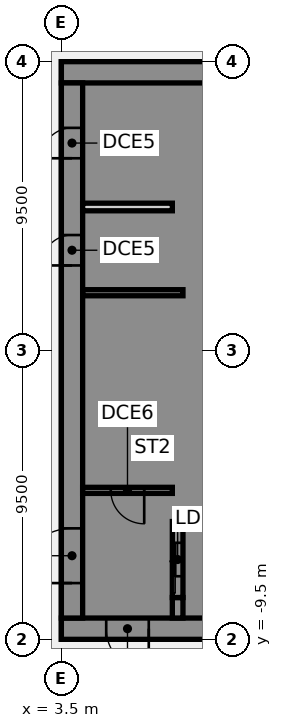
"""IFC4 building model, lengths in metres.
Left out: names, types, materials, properties, quantities, classifications, styles, units other than length and angle.
Written with IfcOpenShell. Run it as: python <this file> out.ifc"""

import sys

from ifc_helpers import new_model, si_unit, direction, frame, frame_2d, origin, place, context, subcontext, project, spatial, polyline, rectangle, outline, extrude, element, fill, save


model = new_model("IFC4")
c1 = context("Model", 3, precision=1e-05, world=origin(), true_north=direction((0.0, 1.0)))
c2 = subcontext(c1, "Body", "Model", "MODEL_VIEW")
j1 = project(units=[si_unit("LENGTHUNIT", "METRE"), si_unit("PLANEANGLEUNIT", "RADIAN")], contexts=[c1])
p1 = place(None, origin())
s1 = spatial("IfcSite", under=j1, at=p1, CompositionType="ELEMENT")
p2 = place(p1, origin())
s2 = spatial("IfcBuilding", under=s1, at=p2, CompositionType="ELEMENT")
p3 = place(p2, frame((0.0, 0.0, 49.0)))
s3 = spatial("IfcBuildingStorey", under=s2, at=p3, CompositionType="ELEMENT", Elevation=49.0)
p4 = place(p3, frame((16.5, -9.15, 0.0), z_axis=(0.0, 0.0, 1.0), x_axis=(-1.0, 0.0, 0.0)))
e1 = element("IfcWall", 1, at=p4, inside=s3, PredefinedType="SHEAR", context=c2, shape_type="SweptSolid", body=[
    extrude(rectangle(XDim=13.0, YDim=0.7, at=frame_2d((6.5, 0.0))), origin(), (0.0, 0.0, 1.0), 3.61),
])
p5 = place(p4, frame((4.15, 0.0, 0.0)))
e2 = element("IfcOpeningElement", 2, at=p5, cuts=e1, PredefinedType="OPENING", context=c2, shape_type="SweptSolid", body=[
    extrude(rectangle(XDim=1.4, YDim=2.1, at=frame_2d((0.7, 1.05))), frame((0.0, 0.36, 0.0), z_axis=(0.0, -1.0, 0.0), x_axis=(1.0, 0.0, 0.0)), (0.0, 0.0, 1.0), 0.72),
])
p6 = place(p4, frame((10.125, 0.0, 0.0)))
e3 = element("IfcOpeningElement", 3, at=p6, cuts=e1, PredefinedType="OPENING", context=c2, shape_type="SweptSolid", body=[
    extrude(rectangle(XDim=1.4, YDim=2.1, at=frame_2d((0.7, 1.05))), frame((0.0, 0.36, 0.0), z_axis=(0.0, -1.0, 0.0), x_axis=(1.0, 0.0, 0.0)), (0.0, 0.0, 1.0), 0.72),
])
p7 = place(p3, frame((16.5, 9.15, 0.0), z_axis=(0.0, 0.0, 1.0), x_axis=(-1.0, 0.0, 0.0)))
e4 = element("IfcWall", 4, at=p7, inside=s3, PredefinedType="SHEAR", context=c2, shape_type="SweptSolid", body=[
    extrude(rectangle(XDim=13.0, YDim=0.7, at=frame_2d((6.5, 0.0))), origin(), (0.0, 0.0, 1.0), 3.61),
])
p8 = place(p3, origin())
e5 = element("IfcWall", 5, at=p8, inside=s3, PredefinedType="SHEAR", context=c2, shape_type="SweptSolid", body=[
    extrude(outline(polyline([(9.8, -5.375), (7.5, -5.375), (7.5, -2.875), (9.8, -2.875), (9.8, -2.625), (7.5, -2.625), (7.5, -0.125), (9.8, -0.125), (9.8, 0.125), (7.5, 0.125), (7.5, 2.625), (9.8, 2.625), (9.8, 2.875), (7.5, 2.875), (7.5, 5.375), (9.8, 5.375), (9.8, 5.625), (7.5, 5.625), (7.5, 8.125), (9.8, 8.125), (9.8, 8.8), (7.5, 8.8), (7.15, 8.8), (7.15, -5.625), (7.5, -5.625), (9.8, -5.625), (9.8, -5.375)])), origin(), (0.0, 0.0, 1.0), 3.61),
])
p9 = place(p3, origin())
e6 = element("IfcWall", 6, at=p9, inside=s3, PredefinedType="SHEAR", context=c2, shape_type="SweptSolid", body=[
    extrude(outline(polyline([(7.5, -8.125), (7.5, -8.8), (9.8, -8.8), (9.8, -8.125), (9.8, -5.625), (9.55, -5.625), (9.55, -8.125), (7.5, -8.125)])), origin(), (0.0, 0.0, 1.0), 3.61),
])
p10 = place(p3, frame((7.325, -8.8, 0.0), z_axis=(0.0, 0.0, 1.0), x_axis=(0.0, 1.0, 0.0)))
e7 = element("IfcWall", 7, at=p10, inside=s3, PredefinedType="SHEAR", context=c2, shape_type="SweptSolid", body=[
    extrude(rectangle(XDim=0.675, YDim=0.35, at=frame_2d((0.337, 0.0))), origin(), (0.0, 0.0, 1.0), 3.61),
])
p11 = place(p3, frame((7.5, 1.9, 0.0), z_axis=(0.0, 0.0, 1.0), x_axis=(-1.0, 0.0, 0.0)))
e8 = element("IfcWall", 8, at=p11, inside=s3, PredefinedType="SHEAR", context=c2, shape_type="SweptSolid", body=[
    extrude(rectangle(XDim=3.3, YDim=0.2, at=frame_2d((1.65, 0.0))), origin(), (0.0, 0.0, 1.0), 3.61),
])
p12 = place(p3, frame((7.325, -8.125, 0.0), z_axis=(0.0, 0.0, 1.0), x_axis=(0.0, 1.0, 0.0)))
e9 = element("IfcWall", 9, at=p12, inside=s3, PredefinedType="SHEAR", context=c2, shape_type="SweptSolid", body=[
    extrude(rectangle(XDim=2.5, YDim=0.35, at=frame_2d((1.25, 0.0))), origin(), (0.0, 0.0, 1.0), 3.61),
])
p13 = place(p12, frame((0.7, 0.0, 0.0)))
e10 = element("IfcOpeningElement", 10, at=p13, cuts=e9, PredefinedType="OPENING", context=c2, shape_type="SweptSolid", body=[
    extrude(rectangle(XDim=1.1, YDim=2.1, at=frame_2d((0.55, 1.05))), frame((0.0, 0.185, 0.0), z_axis=(0.0, -1.0, 0.0), x_axis=(1.0, 0.0, 0.0)), (0.0, 0.0, 1.0), 0.37),
])
p14 = place(p3, frame((3.85, -8.8, 0.0), z_axis=(0.0, 0.0, 1.0), x_axis=(0.0, 1.0, 0.0)))
e11 = element("IfcWall", 11, at=p14, inside=s3, PredefinedType="SHEAR", context=c2, shape_type="SweptSolid", body=[
    extrude(rectangle(XDim=17.6, YDim=0.7, at=frame_2d((8.8, 0.0))), origin(), (0.0, 0.0, 1.0), 3.61),
])
p15 = place(p14, frame((1.15, 0.0, 0.0)))
e12 = element("IfcOpeningElement", 12, at=p15, cuts=e11, PredefinedType="OPENING", context=c2, shape_type="SweptSolid", body=[
    extrude(rectangle(XDim=1.8, YDim=2.1, at=frame_2d((0.9, 1.05))), frame((0.0, 0.36, 0.0), z_axis=(0.0, -1.0, 0.0), x_axis=(1.0, 0.0, 0.0)), (0.0, 0.0, 1.0), 0.72),
])
p16 = place(p14, frame((11.597, 0.0, 0.0)))
e13 = element("IfcOpeningElement", 13, at=p16, cuts=e11, PredefinedType="OPENING", context=c2, shape_type="SweptSolid", body=[
    extrude(rectangle(XDim=1.0, YDim=2.1, at=frame_2d((0.5, 1.05))), frame((0.0, 0.36, 0.0), z_axis=(0.0, -1.0, 0.0), x_axis=(1.0, 0.0, 0.0)), (0.0, 0.0, 1.0), 0.72),
])
p17 = place(p14, frame((15.123, 0.0, 0.0)))
e14 = element("IfcOpeningElement", 14, at=p17, cuts=e11, PredefinedType="OPENING", context=c2, shape_type="SweptSolid", body=[
    extrude(rectangle(XDim=1.0, YDim=2.1, at=frame_2d((0.5, 1.05))), frame((0.0, 0.36, 0.0), z_axis=(0.0, -1.0, 0.0), x_axis=(1.0, 0.0, 0.0)), (0.0, 0.0, 1.0), 0.72),
])
p18 = place(p3, frame((7.15, 4.72, 0.0), z_axis=(0.0, 0.0, 1.0), x_axis=(-1.0, 0.0, 0.0)))
e15 = element("IfcWall", 15, at=p18, inside=s3, PredefinedType="PARTITIONING", context=c2, shape_type="SweptSolid", body=[
    extrude(rectangle(XDim=2.95, YDim=0.25, at=frame_2d((1.475, 0.0))), origin(), (0.0, 0.0, 1.0), 3.61),
])
p19 = place(p3, frame((7.15, -4.6, 0.0), z_axis=(0.0, 0.0, 1.0), x_axis=(-1.0, 0.0, 0.0)))
e16 = element("IfcWall", 16, at=p19, inside=s3, PredefinedType="SHEAR", context=c2, shape_type="SweptSolid", body=[
    extrude(rectangle(XDim=2.95, YDim=0.2, at=frame_2d((1.475, 0.0))), origin(), (0.0, 0.0, 1.0), 3.61),
])
p20 = place(p19, frame((0.925, 0.0, 0.0)))
e17 = element("IfcOpeningElement", 17, at=p20, cuts=e16, PredefinedType="OPENING", context=c2, shape_type="SweptSolid", body=[
    extrude(rectangle(XDim=1.1, YDim=2.1, at=frame_2d((0.55, 1.05))), frame((0.0, 0.11, 0.0), z_axis=(0.0, -1.0, 0.0), x_axis=(1.0, 0.0, 0.0)), (0.0, 0.0, 1.0), 0.22),
])
p21 = place(p6, origin())
e18 = element("IfcDoor", 18, at=p21, inside=s3, OperationType="SINGLE_SWING_LEFT", PredefinedType="DOOR", context=c2, shape_type="SweptSolid", body=[
    extrude(rectangle(XDim=1.4, YDim=2.1, at=frame_2d((0.7, 1.05))), frame((0.0, 0.025, 0.0), z_axis=(0.0, -1.0, 0.0), x_axis=(1.0, 0.0, 0.0)), (0.0, 0.0, 1.0), 0.05),
])
fill(e3, e18)
p22 = place(p15, origin())
e19 = element("IfcDoor", 19, at=p22, inside=s3, OperationType="SINGLE_SWING_LEFT", PredefinedType="DOOR", context=c2, shape_type="SweptSolid", body=[
    extrude(rectangle(XDim=1.8, YDim=2.1, at=frame_2d((0.9, 1.05))), frame((0.0, 0.025, 0.0), z_axis=(0.0, -1.0, 0.0), x_axis=(1.0, 0.0, 0.0)), (0.0, 0.0, 1.0), 0.05),
])
fill(e12, e19)
p23 = place(p16, origin())
e20 = element("IfcDoor", 20, at=p23, inside=s3, OperationType="SINGLE_SWING_LEFT", PredefinedType="DOOR", context=c2, shape_type="SweptSolid", body=[
    extrude(rectangle(XDim=1.0, YDim=2.1, at=frame_2d((0.5, 1.05))), frame((0.0, -0.275, 0.0), z_axis=(0.0, -1.0, 0.0), x_axis=(1.0, 0.0, 0.0)), (0.0, 0.0, 1.0), 0.05),
])
fill(e13, e20)
p24 = place(p17, origin())
e21 = element("IfcDoor", 21, at=p24, inside=s3, OperationType="SINGLE_SWING_LEFT", PredefinedType="DOOR", context=c2, shape_type="SweptSolid", body=[
    extrude(rectangle(XDim=1.0, YDim=2.1, at=frame_2d((0.5, 1.05))), frame((0.0, -0.275, 0.0), z_axis=(0.0, -1.0, 0.0), x_axis=(1.0, 0.0, 0.0)), (0.0, 0.0, 1.0), 0.05),
])
fill(e14, e21)
p25 = place(p20, origin())
e22 = element("IfcDoor", 22, at=p25, inside=s3, OperationType="SINGLE_SWING_LEFT", PredefinedType="DOOR", context=c2, shape_type="SweptSolid", body=[
    extrude(rectangle(XDim=1.1, YDim=2.1, at=frame_2d((0.55, 1.05))), frame((0.0, 0.025, 0.0), z_axis=(0.0, -1.0, 0.0), x_axis=(1.0, 0.0, 0.0)), (0.0, 0.0, 1.0), 0.05),
])
fill(e17, e22)
p26 = place(p13, origin())
e23 = element("IfcDoor", 23, at=p26, inside=s3, OperationType="SLIDING_TO_LEFT", PredefinedType="DOOR", context=c2, shape_type="SweptSolid", body=[
    extrude(rectangle(XDim=1.1, YDim=2.1, at=frame_2d((0.55, 1.05))), frame((0.0, 0.025, 0.0), z_axis=(0.0, -1.0, 0.0), x_axis=(1.0, 0.0, 0.0)), (0.0, 0.0, 1.0), 0.05),
])
fill(e10, e23)
save(model, sys.argv[1])
